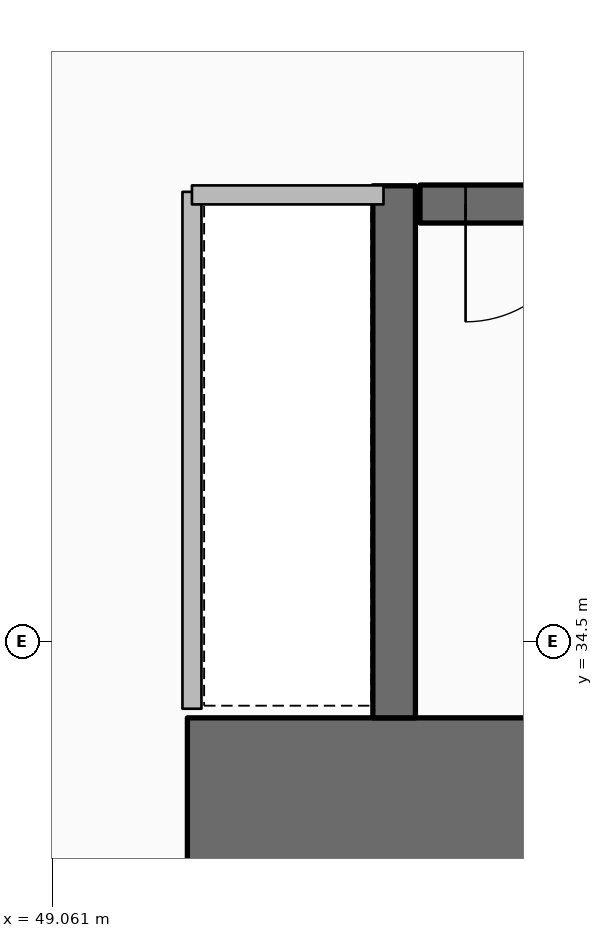
"""IFC4 building model, lengths in metres.
Left out: names, types, materials, properties, quantities, classifications, styles, units other than length and angle.
Written with IfcOpenShell. Run it as: python <this file> out.ifc"""

import sys

from ifc_helpers import new_model, si_unit, direction, frame, frame_2d, origin, place, context, subcontext, project, spatial, rectangle, extrude, element, fill, save


model = new_model("IFC4")
c1 = context("Model", 3, precision=1e-05, world=origin(), true_north=direction((0.0, 1.0)))
c2 = subcontext(c1, "Body", "Model", "MODEL_VIEW")
j1 = project(units=[si_unit("LENGTHUNIT", "METRE"), si_unit("PLANEANGLEUNIT", "RADIAN")], contexts=[c1])
p1 = place(None, origin())
s1 = spatial("IfcSite", under=j1, at=p1, CompositionType="ELEMENT")
p2 = place(p1, origin())
s2 = spatial("IfcBuilding", under=s1, at=p2, CompositionType="ELEMENT")
p3 = place(p2, frame((0.0, 0.0, 7.2)))
s3 = spatial("IfcBuildingStorey", under=s2, at=p3, CompositionType="ELEMENT", Elevation=7.2)
p4 = place(p3, frame((49.95, 33.45, 0.0), z_axis=(0.0, 0.0, 1.0), x_axis=(1.0, 0.0, 0.0)))
e1 = element("IfcWall", 1, at=p4, inside=s3, PredefinedType="SHEAR", context=c2, shape_type="SweptSolid", body=[
    extrude(rectangle(XDim=10.2, YDim=1.1, at=frame_2d((5.1, 0.0))), origin(), (0.0, 0.0, 1.0), 4.8),
])
p5 = place(p3, frame((51.31, 34.0, 0.0), z_axis=(0.0, 0.0, 1.0), x_axis=(0.0, 1.0, 0.0)))
e2 = element("IfcWall", 2, at=p5, inside=s3, PredefinedType="SHEAR", context=c2, shape_type="SweptSolid", body=[
    extrude(rectangle(XDim=3.5, YDim=0.28, at=frame_2d((1.75, 0.0))), origin(), (0.0, 0.0, 1.0), 4.8),
])
p6 = place(p3, frame((51.48, 37.38, 0.0), z_axis=(0.0, 0.0, 1.0), x_axis=(1.0, 0.0, 0.0)))
e3 = element("IfcWall", 3, at=p6, inside=s3, PredefinedType="SOLIDWALL", context=c2, shape_type="SweptSolid", body=[
    extrude(rectangle(XDim=7.54, YDim=0.25, at=frame_2d((3.77, 0.0))), origin(), (0.0, 0.0, 1.0), 4.48),
])
p7 = place(p6, frame((0.3, 0.0, 0.0)))
e4 = element("IfcOpeningElement", 4, at=p7, cuts=e3, PredefinedType="OPENING", context=c2, shape_type="SweptSolid", body=[
    extrude(rectangle(XDim=1.55, YDim=2.15, at=frame_2d((0.775, 1.075))), frame((0.0, 0.135, 0.0), z_axis=(0.0, -1.0, 0.0), x_axis=(1.0, 0.0, 0.0)), (0.0, 0.0, 1.0), 0.27),
])
p8 = place(p3, frame((49.98, 34.06, 0.0), z_axis=(0.0, 0.0, 1.0), x_axis=(0.0, 1.0, 0.0)))
e5 = element("IfcWall", 5, at=p8, inside=s3, PredefinedType="PARTITIONING", context=c2, shape_type="SweptSolid", body=[
    extrude(rectangle(XDim=3.4, YDim=0.125, at=frame_2d((1.7, 0.0))), origin(), (0.0, 0.0, 1.0), 3.92),
])
p9 = place(p3, frame((49.98, 37.44, 0.0), z_axis=(0.0, 0.0, 1.0), x_axis=(1.0, 0.0, 0.0)))
e6 = element("IfcWall", 6, at=p9, inside=s3, PredefinedType="PARTITIONING", context=c2, shape_type="SweptSolid", body=[
    extrude(rectangle(XDim=1.26, YDim=0.125, at=frame_2d((0.63, 0.0))), origin(), (0.0, 0.0, 1.0), 3.92),
])
p10 = place(p7, origin())
e7 = element("IfcDoor", 7, at=p10, inside=s3, OperationType="DOUBLE_DOOR_SINGLE_SWING", PredefinedType="DOOR", context=c2, shape_type="SweptSolid", body=[
    extrude(rectangle(XDim=1.55, YDim=2.15, at=frame_2d((0.775, 1.075))), frame((0.0, 0.025, 0.0), z_axis=(0.0, -1.0, 0.0), x_axis=(1.0, 0.0, 0.0)), (0.0, 0.0, 1.0), 0.05),
])
fill(e4, e7)
save(model, sys.argv[1])
